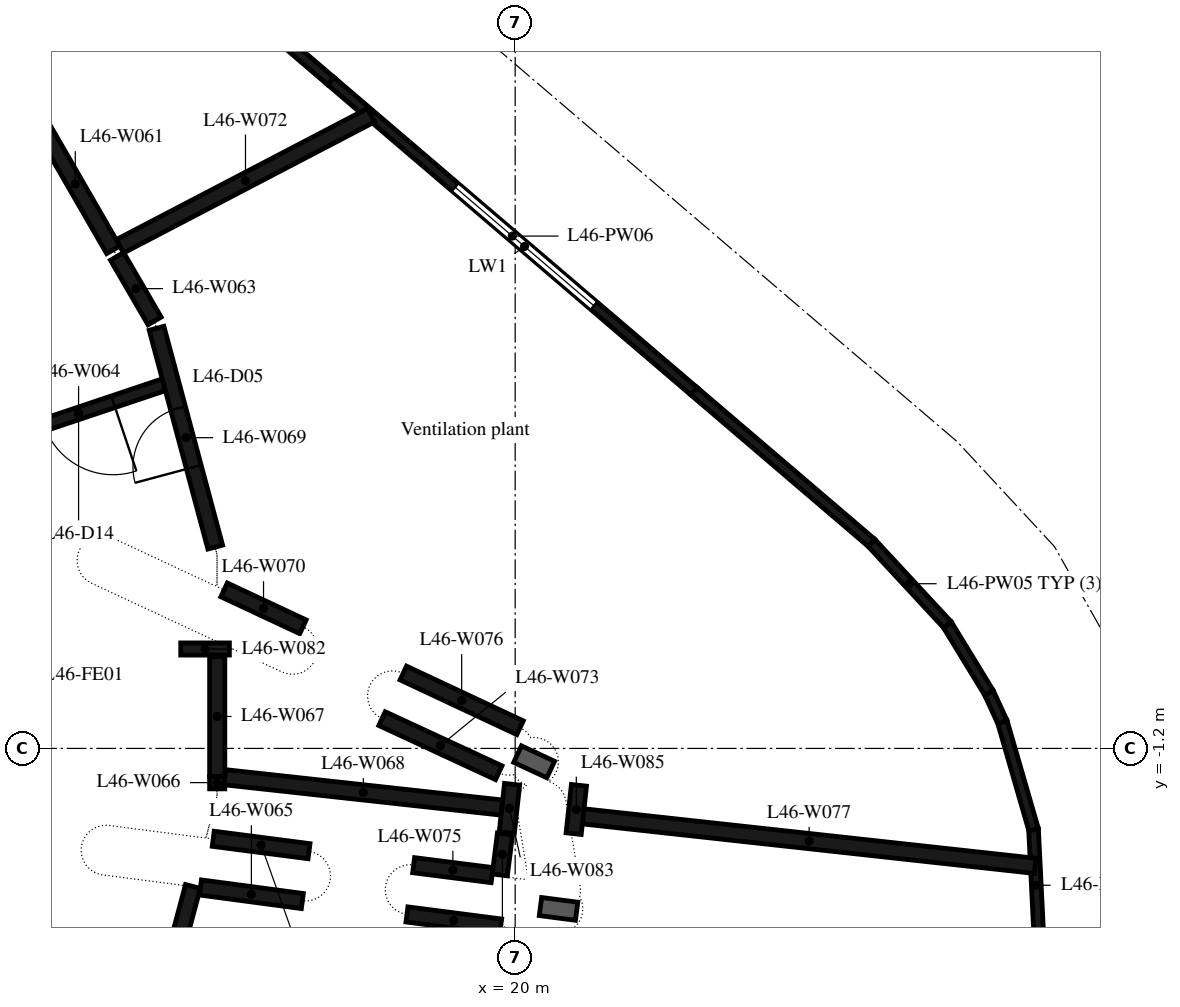
"""IFC4 building model, lengths in metres.
Left out: names, types, materials, properties, quantities, classifications, styles, units other than length and angle.
Written with IfcOpenShell. Run it as: python <this file> out.ifc"""

import sys

from ifc_helpers import new_model, si_unit, direction, frame, frame_2d, origin, place, context, subcontext, project, spatial, rectangle, extrude, element, fill, save


model = new_model("IFC4")
c1 = context("Model", 3, precision=1e-05, world=origin(), true_north=direction((0.0, 1.0)))
c2 = subcontext(c1, "Body", "Model", "MODEL_VIEW")
j1 = project(units=[si_unit("LENGTHUNIT", "METRE"), si_unit("PLANEANGLEUNIT", "RADIAN")], contexts=[c1])
p1 = place(None, origin())
s1 = spatial("IfcSite", under=j1, at=p1, CompositionType="ELEMENT")
p2 = place(p1, origin())
s2 = spatial("IfcBuilding", under=s1, at=p2, CompositionType="ELEMENT")
p3 = place(p2, frame((0.0, 0.0, 183.2)))
s3 = spatial("IfcBuildingStorey", under=s2, at=p3, CompositionType="ELEMENT", Elevation=183.2)
p4 = place(p3, frame((28.615, -4.373, 0.0), z_axis=(0.0, 0.0, 1.0), x_axis=(-0.049272179595, 0.998785388518, 0.0)))
e1 = element("IfcWall", 1, at=p4, inside=s3, PredefinedType="STANDARD", context=c2, shape_type="SweptSolid", body=[
    extrude(rectangle(XDim=1.848, YDim=0.16, at=frame_2d((0.924, 0.0))), origin(), (0.0, 0.0, 1.0), 4.75),
])
p5 = place(p3, frame((28.526, -2.536, 0.0), z_axis=(0.0, 0.0, 1.0), x_axis=(-0.278420792997, 0.960459193317, 0.0)))
e2 = element("IfcWall", 2, at=p5, inside=s3, PredefinedType="STANDARD", context=c2, shape_type="SweptSolid", body=[
    extrude(rectangle(XDim=1.847, YDim=0.16, at=frame_2d((0.923, 0.0))), origin(), (0.0, 0.0, 1.0), 4.75),
])
p6 = place(p3, frame((28.014, -0.768, 0.0), z_axis=(0.0, 0.0, 1.0), x_axis=(-0.418883410895, 0.908040025592, 0.0)))
e3 = element("IfcWall", 3, at=p6, inside=s3, PredefinedType="STANDARD", context=c2, shape_type="SweptSolid", body=[
    extrude(rectangle(XDim=0.531, YDim=0.16, at=frame_2d((0.266, 0.0))), origin(), (0.0, 0.0, 1.0), 4.75),
])
p7 = place(p3, frame((27.791, -0.286, 0.0), z_axis=(0.0, 0.0, 1.0), x_axis=(-0.521105033846, 0.853492556324, 0.0)))
e4 = element("IfcWall", 4, at=p7, inside=s3, PredefinedType="STANDARD", context=c2, shape_type="SweptSolid", body=[
    extrude(rectangle(XDim=1.317, YDim=0.16, at=frame_2d((0.658, 0.0))), origin(), (0.0, 0.0, 1.0), 4.75),
])
p8 = place(p3, frame((27.11, 0.832, 0.0), z_axis=(0.0, 0.0, 1.0), x_axis=(-0.679806325686, 0.733391682226, 0.0)))
e5 = element("IfcWall", 5, at=p8, inside=s3, PredefinedType="STANDARD", context=c2, shape_type="SweptSolid", body=[
    extrude(rectangle(XDim=1.845, YDim=0.16, at=frame_2d((0.923, 0.0))), origin(), (0.0, 0.0, 1.0), 4.75),
])
p9 = place(p3, frame((25.858, 2.182, 0.0), z_axis=(0.0, 0.0, 1.0), x_axis=(-0.760369748935, 0.649490450203, 0.0)))
e6 = element("IfcWall", 6, at=p9, inside=s3, PredefinedType="STANDARD", context=c2, shape_type="SweptSolid", body=[
    extrude(rectangle(XDim=3.836, YDim=0.16, at=frame_2d((1.918, 0.0))), origin(), (0.0, 0.0, 1.0), 4.75),
])
p10 = place(p3, frame((22.942, 4.673, 0.0), z_axis=(0.0, 0.0, 1.0), x_axis=(-0.76041522011, 0.649437212535, 0.0)))
e7 = element("IfcWall", 7, at=p10, inside=s3, PredefinedType="STANDARD", context=c2, shape_type="SweptSolid", body=[
    extrude(rectangle(XDim=7.86, YDim=0.16, at=frame_2d((3.93, 0.0))), origin(), (0.0, 0.0, 1.0), 4.75),
])
p11 = place(p10, frame((2.167, 0.0, 1.0)))
e8 = element("IfcOpeningElement", 8, at=p11, cuts=e7, PredefinedType="OPENING", context=c2, shape_type="SweptSolid", body=[
    extrude(rectangle(XDim=3.0, YDim=2.2, at=frame_2d((1.5, 1.1))), frame((0.0, 0.09, 0.0), z_axis=(0.0, -1.0, 0.0), x_axis=(1.0, 0.0, 0.0)), (0.0, 0.0, 1.0), 0.18),
])
p12 = place(p3, frame((16.965, 9.778, 0.0), z_axis=(0.0, 0.0, 1.0), x_axis=(-0.760402119436, 0.649452551582, 0.0)))
e9 = element("IfcWall", 9, at=p12, inside=s3, PredefinedType="STANDARD", context=c2, shape_type="SweptSolid", body=[
    extrude(rectangle(XDim=7.86, YDim=0.16, at=frame_2d((3.93, 0.0))), origin(), (0.0, 0.0, 1.0), 4.75),
])
p13 = place(p12, frame((2.43, 0.0, 1.0)))
e10 = element("IfcOpeningElement", 10, at=p13, cuts=e9, PredefinedType="OPENING", context=c2, shape_type="SweptSolid", body=[
    extrude(rectangle(XDim=3.0, YDim=2.2, at=frame_2d((1.5, 1.1))), frame((0.0, 0.09, 0.0), z_axis=(0.0, -1.0, 0.0), x_axis=(1.0, 0.0, 0.0)), (0.0, 0.0, 1.0), 0.18),
])
p14 = place(p3, frame((13.39, 7.0, 0.0), z_axis=(0.0, 0.0, 1.0), x_axis=(-0.499790202325, 0.86614649665, 0.0)))
e11 = element("IfcWall", 11, at=p14, inside=s3, PredefinedType="PARTITIONING", context=c2, shape_type="SweptSolid", body=[
    extrude(rectangle(XDim=2.496, YDim=0.25, at=frame_2d((1.248, 0.0))), origin(), (0.0, 0.0, 1.0), 4.75),
])
p15 = place(p3, frame((14.102, -5.709, 0.0), z_axis=(0.0, 0.0, 1.0), x_axis=(0.257872450401, 0.966178968579, 0.0)))
e12 = element("IfcWall", 12, at=p15, inside=s3, PredefinedType="PARTITIONING", context=c2, shape_type="SweptSolid", body=[
    extrude(rectangle(XDim=2.318, YDim=0.25, at=frame_2d((1.159, 0.0))), origin(), (0.0, 0.0, 1.0), 4.75),
])
p16 = place(p3, frame((14.07, 5.83, 0.0), z_axis=(0.0, 0.0, 1.0), x_axis=(-0.502547897079, 0.864549368828, 0.0)))
e13 = element("IfcWall", 13, at=p16, inside=s3, PredefinedType="PARTITIONING", context=c2, shape_type="SweptSolid", body=[
    extrude(rectangle(XDim=1.228, YDim=0.25, at=frame_2d((0.614, 0.0))), origin(), (0.0, 0.0, 1.0), 4.75),
])
p17 = place(p3, frame((14.34, 4.82, 0.0), z_axis=(0.0, 0.0, 1.0), x_axis=(-0.94805712629, -0.318100118345, 0.0)))
e14 = element("IfcWall", 14, at=p17, inside=s3, PredefinedType="PARTITIONING", context=c2, shape_type="SweptSolid", body=[
    extrude(rectangle(XDim=3.207, YDim=0.2, at=frame_2d((1.603, 0.0))), origin(), (0.0, 0.0, 1.0), 4.75),
])
p18 = place(p17, frame((1.003, 0.0, 0.0)))
e15 = element("IfcOpeningElement", 15, at=p18, cuts=e14, PredefinedType="OPENING", context=c2, shape_type="SweptSolid", body=[
    extrude(rectangle(XDim=1.2, YDim=2.1, at=frame_2d((0.6, 1.05))), frame((0.0, 0.11, 0.0), z_axis=(0.0, -1.0, 0.0), x_axis=(1.0, 0.0, 0.0)), (0.0, 0.0, 1.0), 0.22),
])
p19 = place(p3, frame((14.824, -3.487, 0.0), z_axis=(0.0, 0.0, 1.0), x_axis=(0.991234204775, -0.132116430789, 0.0)))
e16 = element("IfcWall", 16, at=p19, inside=s3, PredefinedType="PARTITIONING", context=c2, shape_type="SweptSolid", body=[
    extrude(rectangle(XDim=1.691, YDim=0.25, at=frame_2d((0.845, 0.0))), origin(), (0.0, 0.0, 1.0), 4.75),
])
p20 = place(p3, frame((15.1, -1.865, 0.0), z_axis=(0.0, 0.0, 1.0), x_axis=(0.0, 1.0, 0.0)))
e17 = element("IfcWall", 17, at=p20, inside=s3, PredefinedType="PARTITIONING", context=c2, shape_type="SweptSolid", body=[
    extrude(rectangle(XDim=0.205, YDim=0.25, at=frame_2d((0.103, 0.0))), origin(), (0.0, 0.0, 1.0), 4.75),
])
p21 = place(p3, frame((15.1, -1.66, 0.0), z_axis=(0.0, 0.0, 1.0), x_axis=(0.0, 1.0, 0.0)))
e18 = element("IfcWall", 18, at=p21, inside=s3, PredefinedType="PARTITIONING", context=c2, shape_type="SweptSolid", body=[
    extrude(rectangle(XDim=1.97, YDim=0.25, at=frame_2d((0.985, 0.0))), origin(), (0.0, 0.0, 1.0), 4.75),
])
p22 = place(p3, frame((15.224, -1.674, 0.0), z_axis=(0.0, 0.0, 1.0), x_axis=(0.994052069643, -0.10890584391, 0.0)))
e19 = element("IfcWall", 19, at=p22, inside=s3, PredefinedType="PARTITIONING", context=c2, shape_type="SweptSolid", body=[
    extrude(rectangle(XDim=4.584, YDim=0.25, at=frame_2d((2.292, 0.0))), origin(), (0.0, 0.0, 1.0), 4.75),
])
p23 = place(p3, frame((15.068, 2.111, 0.0), z_axis=(0.0, 0.0, 1.0), x_axis=(-0.259106201401, 0.965848837239, 0.0)))
e20 = element("IfcWall", 20, at=p23, inside=s3, PredefinedType="PARTITIONING", context=c2, shape_type="SweptSolid", body=[
    extrude(rectangle(XDim=3.726, YDim=0.25, at=frame_2d((1.863, 0.0))), origin(), (0.0, 0.0, 1.0), 4.75),
])
p24 = place(p23, frame((1.363, 0.0, 0.0)))
e21 = element("IfcOpeningElement", 21, at=p24, cuts=e20, PredefinedType="OPENING", context=c2, shape_type="SweptSolid", body=[
    extrude(rectangle(XDim=1.0, YDim=2.1, at=frame_2d((0.5, 1.05))), frame((0.0, 0.135, 0.0), z_axis=(0.0, -1.0, 0.0), x_axis=(1.0, 0.0, 0.0)), (0.0, 0.0, 1.0), 0.27),
])
p25 = place(p3, frame((16.51, 0.8, 0.0), z_axis=(0.0, 0.0, 1.0), x_axis=(-0.905720868183, 0.423874638235, 0.0)))
e22 = element("IfcWall", 22, at=p25, inside=s3, PredefinedType="PARTITIONING", context=c2, shape_type="SweptSolid", body=[
    extrude(rectangle(XDim=1.432, YDim=0.25, at=frame_2d((0.716, 0.0))), origin(), (0.0, 0.0, 1.0), 4.75),
])
p26 = place(p3, frame((16.61, -2.89, 0.0), z_axis=(0.0, 0.0, 1.0), x_axis=(-0.991739457585, 0.128268656611, 0.0)))
e23 = element("IfcWall", 23, at=p26, inside=s3, PredefinedType="PARTITIONING", context=c2, shape_type="SweptSolid", body=[
    extrude(rectangle(XDim=1.589, YDim=0.25, at=frame_2d((0.795, 0.0))), origin(), (0.0, 0.0, 1.0), 4.75),
])
p27 = place(p3, frame((17.629, 9.213, 0.0), z_axis=(0.0, 0.0, 1.0), x_axis=(-0.8864904177, -0.462746949559, 0.0)))
e24 = element("IfcWall", 24, at=p27, inside=s3, PredefinedType="PARTITIONING", context=c2, shape_type="SweptSolid", body=[
    extrude(rectangle(XDim=4.657, YDim=0.25, at=frame_2d((2.329, 0.0))), origin(), (0.0, 0.0, 1.0), 4.75),
])
p28 = place(p3, frame((17.81, -0.71, 0.0), z_axis=(0.0, 0.0, 1.0), x_axis=(0.907235451834, -0.420623150736, 0.0)))
e25 = element("IfcWall", 25, at=p28, inside=s3, PredefinedType="PARTITIONING", context=c2, shape_type="SweptSolid", body=[
    extrude(rectangle(XDim=2.116, YDim=0.25, at=frame_2d((1.058, 0.0))), origin(), (0.0, 0.0, 1.0), 4.75),
])
p29 = place(p3, frame((18.22, -3.93, 0.0), z_axis=(0.0, 0.0, 1.0), x_axis=(0.991732145858, -0.128325176301, 0.0)))
e26 = element("IfcWall", 26, at=p29, inside=s3, PredefinedType="PARTITIONING", context=c2, shape_type="SweptSolid", body=[
    extrude(rectangle(XDim=1.554, YDim=0.25, at=frame_2d((0.777, 0.0))), origin(), (0.0, 0.0, 1.0), 4.75),
])
p30 = place(p3, frame((19.62, -3.284, 0.0), z_axis=(0.0, 0.0, 1.0), x_axis=(-0.992059772681, 0.125767274872, 0.0)))
e27 = element("IfcWall", 27, at=p30, inside=s3, PredefinedType="PARTITIONING", context=c2, shape_type="SweptSolid", body=[
    extrude(rectangle(XDim=1.301, YDim=0.25, at=frame_2d((0.65, 0.0))), origin(), (0.0, 0.0, 1.0), 4.75),
])
p31 = place(p3, frame((20.08, -0.86, 0.0), z_axis=(0.0, 0.0, 1.0), x_axis=(-0.905446492275, 0.424460421744, 0.0)))
e28 = element("IfcWall", 28, at=p31, inside=s3, PredefinedType="PARTITIONING", context=c2, shape_type="SweptSolid", body=[
    extrude(rectangle(XDim=2.121, YDim=0.25, at=frame_2d((1.06, 0.0))), origin(), (0.0, 0.0, 1.0), 4.75),
])
p32 = place(p3, frame((21.118, -2.317, 0.0), z_axis=(0.0, 0.0, 1.0), x_axis=(0.994052596122, -0.108901038305, 0.0)))
e29 = element("IfcWall", 29, at=p32, inside=s3, PredefinedType="PARTITIONING", context=c2, shape_type="SweptSolid", body=[
    extrude(rectangle(XDim=7.477, YDim=0.25, at=frame_2d((3.738, 0.0))), origin(), (0.0, 0.0, 1.0), 4.75),
])
p33 = place(p3, frame((15.3, 0.435, 0.0), z_axis=(0.0, 0.0, 1.0), x_axis=(-1.0, 0.0, 0.0)))
e30 = element("IfcWall", 30, at=p33, inside=s3, PredefinedType="PARTITIONING", context=c2, shape_type="SweptSolid", body=[
    extrude(rectangle(XDim=0.8, YDim=0.2, at=frame_2d((0.4, 0.0))), origin(), (0.0, 0.0, 1.0), 4.75),
])
p34 = place(p3, frame((19.862, -2.584, 0.0), z_axis=(0.0, 0.0, 1.0), x_axis=(0.108655902306, 0.994079420818, 0.0)))
e31 = element("IfcWall", 31, at=p34, inside=s3, PredefinedType="PARTITIONING", context=c2, shape_type="SweptSolid", body=[
    extrude(rectangle(XDim=0.8, YDim=0.25, at=frame_2d((0.4, 0.0))), origin(), (0.0, 0.0, 1.0), 4.75),
])
p35 = place(p3, frame((19.747, -3.28, 0.0), z_axis=(0.0, 0.0, 1.0), x_axis=(0.125978143653, 0.992033017254, 0.0)))
e32 = element("IfcWall", 32, at=p35, inside=s3, PredefinedType="PARTITIONING", context=c2, shape_type="SweptSolid", body=[
    extrude(rectangle(XDim=0.68, YDim=0.25, at=frame_2d((0.34, 0.0))), origin(), (0.0, 0.0, 1.0), 4.75),
])
p36 = place(p3, frame((21.049, -1.807, 0.0), z_axis=(0.0, 0.0, 1.0), x_axis=(-0.108655902306, -0.994079420818, 0.0)))
e33 = element("IfcWall", 33, at=p36, inside=s3, PredefinedType="PARTITIONING", context=c2, shape_type="SweptSolid", body=[
    extrude(rectangle(XDim=0.8, YDim=0.25, at=frame_2d((0.4, 0.0))), origin(), (0.0, 0.0, 1.0), 4.75),
])
p37 = place(p11, origin())
e34 = element("IfcWindow", 34, at=p37, inside=s3, PartitioningType="SINGLE_PANEL", PredefinedType="WINDOW", context=c2, shape_type="SweptSolid", body=[
    extrude(rectangle(XDim=3.0, YDim=2.2, at=frame_2d((1.5, 1.1))), frame((0.0, 0.03, 0.0), z_axis=(0.0, -1.0, 0.0), x_axis=(1.0, 0.0, 0.0)), (0.0, 0.0, 1.0), 0.06),
])
fill(e8, e34)
p38 = place(p24, origin())
e35 = element("IfcDoor", 35, at=p38, inside=s3, OperationType="SINGLE_SWING_LEFT", PredefinedType="DOOR", context=c2, shape_type="SweptSolid", body=[
    extrude(rectangle(XDim=1.0, YDim=2.1, at=frame_2d((0.5, 1.05))), frame((0.0, 0.025, 0.0), z_axis=(0.0, -1.0, 0.0), x_axis=(1.0, 0.0, 0.0)), (0.0, 0.0, 1.0), 0.05),
])
fill(e21, e35)
p39 = place(p18, origin())
e36 = element("IfcDoor", 36, at=p39, inside=s3, OperationType="SINGLE_SWING_LEFT", PredefinedType="DOOR", context=c2, shape_type="SweptSolid", body=[
    extrude(rectangle(XDim=1.2, YDim=2.1, at=frame_2d((0.6, 1.05))), frame((0.0, 0.025, 0.0), z_axis=(0.0, -1.0, 0.0), x_axis=(1.0, 0.0, 0.0)), (0.0, 0.0, 1.0), 0.05),
])
fill(e15, e36)
save(model, sys.argv[1])
